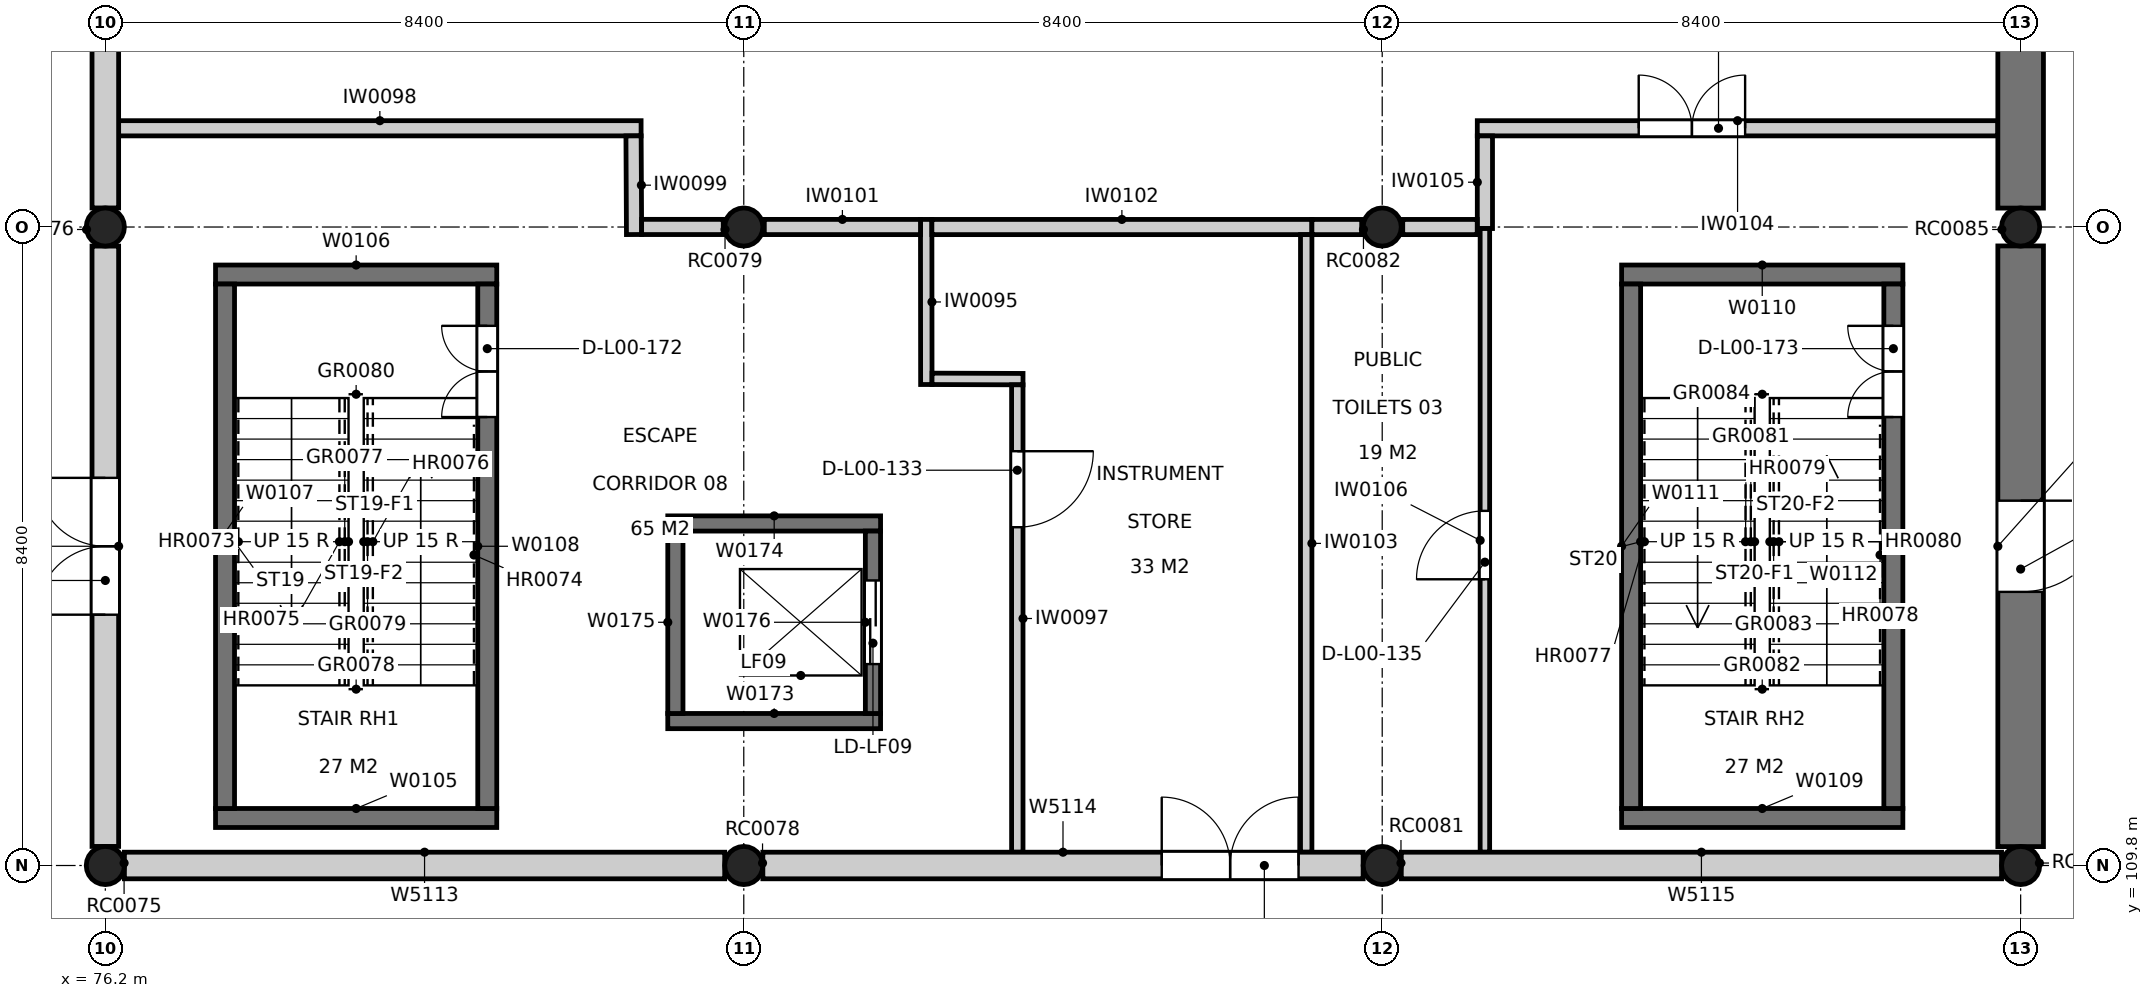
"""IFC4 building model, lengths in metres.
Left out: names, types, materials, properties, quantities, classifications, styles, units other than length and angle.
Written with IfcOpenShell. Run it as: python <this file> out.ifc"""

import sys

from ifc_helpers import new_model, si_unit, direction, frame, frame_2d, origin, origin_2d, place, context, subcontext, project, spatial, rectangle, circle, extrude, element, fill, save


model = new_model("IFC4")
c1 = context("Model", 3, precision=1e-05, world=origin(), true_north=direction((0.0, 1.0)))
c2 = subcontext(c1, "Body", "Model", "MODEL_VIEW")
j1 = project(units=[si_unit("LENGTHUNIT", "METRE"), si_unit("PLANEANGLEUNIT", "RADIAN")], contexts=[c1])
p1 = place(None, origin())
s1 = spatial("IfcSite", under=j1, at=p1, CompositionType="ELEMENT")
p2 = place(p1, origin())
s2 = spatial("IfcBuilding", under=s1, at=p2, CompositionType="ELEMENT")
p3 = place(p2, origin())
s3 = spatial("IfcBuildingStorey", under=s2, at=p3, CompositionType="ELEMENT", Elevation=0.0)
for number, where, z_axis, x_axis in (
    (1, (76.2, 109.8, -0.4), (0.0, 0.0, 1.0), (1.0, 0.0, 0.0)),
    (2, (76.2, 118.2, -0.4), (0.0, 0.0, 1.0), (1.0, 0.0, 0.0)),
    (3, (84.6, 109.8, -0.4), (0.0, 0.0, 1.0), (1.0, 0.0, 0.0)),
    (4, (84.6, 118.2, -0.4), (0.0, 0.0, 1.0), (1.0, 0.0, 0.0)),
    (5, (93.0, 109.8, -0.4), (0.0, 0.0, 1.0), (1.0, 0.0, 0.0)),
    (6, (93.0, 118.2, -0.4), (0.0, 0.0, 1.0), (1.0, 0.0, 0.0)),
    (7, (101.4, 109.8, -0.4), (0.0, 0.0, 1.0), (1.0, 0.0, 0.0)),
    (8, (101.4, 118.2, -0.4), (0.0, 0.0, 1.0), (1.0, 0.0, 0.0)),
):
    element("IfcColumn", number, at=place(p3, frame(where, z_axis=z_axis, x_axis=x_axis)), inside=s3, PredefinedType="COLUMN", context=c2, shape_type="SweptSolid", body=[
        extrude(circle(Radius=0.25, at=origin_2d()), origin(), (0.0, 0.0, 1.0), 5.2),
    ])
p4 = place(p3, frame((101.4, 110.049, 0.0), z_axis=(0.0, 0.0, 1.0), x_axis=(0.0, 1.0, 0.0)))
e9 = element("IfcWall", 9, at=p4, inside=s3, PredefinedType="SOLIDWALL", context=c2, shape_type="SweptSolid", body=[
    extrude(rectangle(XDim=7.902, YDim=0.6, at=frame_2d((3.951, 0.0))), origin(), (0.0, 0.0, 1.0), 4.8),
])
p5 = place(p4, frame((4.551, 0.0, 0.0), z_axis=(0.0, 0.0, 1.0), x_axis=(-1.0, 0.0, 0.0)))
e10 = element("IfcOpeningElement", 10, at=p5, cuts=e9, PredefinedType="OPENING", context=c2, shape_type="SweptSolid", body=[
    extrude(rectangle(XDim=1.2, YDim=2.1, at=frame_2d((0.6, 1.05))), frame((0.0, 0.31, 0.0), z_axis=(0.0, -1.0, 0.0), x_axis=(1.0, 0.0, 0.0)), (0.0, 0.0, 1.0), 0.62),
])
p6 = place(p3, frame((101.4, 118.449, 0.0), z_axis=(0.0, 0.0, 1.0), x_axis=(0.0, 1.0, 0.0)))
e11 = element("IfcWall", 11, at=p6, inside=s3, PredefinedType="SOLIDWALL", context=c2, shape_type="SweptSolid", body=[
    extrude(rectangle(XDim=7.902, YDim=0.6, at=frame_2d((3.951, 0.0))), origin(), (0.0, 0.0, 1.0), 4.8),
])
for number, where, z_axis, x_axis in (
    (12, (77.65, 110.425, 0.0), (0.0, 0.0, 1.0), (1.0, 0.0, 0.0)),
    (13, (77.65, 117.575, 0.0), (0.0, 0.0, 1.0), (1.0, 0.0, 0.0)),
):
    element("IfcWall", number, at=place(p3, frame(where, z_axis=z_axis, x_axis=x_axis)), inside=s3, PredefinedType="SOLIDWALL", context=c2, shape_type="SweptSolid", body=[
        extrude(rectangle(XDim=3.7, YDim=0.25, at=frame_2d((1.85, 0.0))), origin(), (0.0, 0.0, 1.0), 4.8),
    ])
p7 = place(p3, frame((77.775, 110.55, 0.0), z_axis=(0.0, 0.0, 1.0), x_axis=(0.0, 1.0, 0.0)))
e14 = element("IfcWall", 14, at=p7, inside=s3, PredefinedType="SOLIDWALL", context=c2, shape_type="SweptSolid", body=[
    extrude(rectangle(XDim=6.9, YDim=0.25, at=frame_2d((3.45, 0.0))), origin(), (0.0, 0.0, 1.0), 4.8),
])
p8 = place(p3, frame((81.225, 110.55, 0.0), z_axis=(0.0, 0.0, 1.0), x_axis=(0.0, 1.0, 0.0)))
e15 = element("IfcWall", 15, at=p8, inside=s3, PredefinedType="SOLIDWALL", context=c2, shape_type="SweptSolid", body=[
    extrude(rectangle(XDim=6.9, YDim=0.25, at=frame_2d((3.45, 0.0))), origin(), (0.0, 0.0, 1.0), 4.8),
])
p9 = place(p8, frame((5.15, 0.0, 0.0)))
e16 = element("IfcOpeningElement", 16, at=p9, cuts=e15, PredefinedType="OPENING", context=c2, shape_type="SweptSolid", body=[
    extrude(rectangle(XDim=1.2, YDim=2.1, at=frame_2d((0.6, 1.05))), frame((0.0, 0.135, 0.0), z_axis=(0.0, -1.0, 0.0), x_axis=(1.0, 0.0, 0.0)), (0.0, 0.0, 1.0), 0.27),
])
for number, where, z_axis, x_axis in (
    (17, (96.15, 110.425, 0.0), (0.0, 0.0, 1.0), (1.0, 0.0, 0.0)),
    (18, (96.15, 117.575, 0.0), (0.0, 0.0, 1.0), (1.0, 0.0, 0.0)),
):
    element("IfcWall", number, at=place(p3, frame(where, z_axis=z_axis, x_axis=x_axis)), inside=s3, PredefinedType="SOLIDWALL", context=c2, shape_type="SweptSolid", body=[
        extrude(rectangle(XDim=3.7, YDim=0.25, at=frame_2d((1.85, 0.0))), origin(), (0.0, 0.0, 1.0), 4.8),
    ])
p10 = place(p3, frame((96.275, 110.55, 0.0), z_axis=(0.0, 0.0, 1.0), x_axis=(0.0, 1.0, 0.0)))
e19 = element("IfcWall", 19, at=p10, inside=s3, PredefinedType="SOLIDWALL", context=c2, shape_type="SweptSolid", body=[
    extrude(rectangle(XDim=6.9, YDim=0.25, at=frame_2d((3.45, 0.0))), origin(), (0.0, 0.0, 1.0), 4.8),
])
p11 = place(p3, frame((99.725, 110.55, 0.0), z_axis=(0.0, 0.0, 1.0), x_axis=(0.0, 1.0, 0.0)))
e20 = element("IfcWall", 20, at=p11, inside=s3, PredefinedType="SOLIDWALL", context=c2, shape_type="SweptSolid", body=[
    extrude(rectangle(XDim=6.9, YDim=0.25, at=frame_2d((3.45, 0.0))), origin(), (0.0, 0.0, 1.0), 4.8),
])
p12 = place(p11, frame((5.15, 0.0, 0.0)))
e21 = element("IfcOpeningElement", 21, at=p12, cuts=e20, PredefinedType="OPENING", context=c2, shape_type="SweptSolid", body=[
    extrude(rectangle(XDim=1.2, YDim=2.1, at=frame_2d((0.6, 1.05))), frame((0.0, 0.135, 0.0), z_axis=(0.0, -1.0, 0.0), x_axis=(1.0, 0.0, 0.0)), (0.0, 0.0, 1.0), 0.27),
])
for number, where, z_axis, x_axis in (
    (22, (83.6, 111.7, -1.4), (0.0, 0.0, 1.0), (1.0, 0.0, 0.0)),
    (23, (83.6, 114.3, -1.4), (0.0, 0.0, 1.0), (1.0, 0.0, 0.0)),
):
    element("IfcWall", number, at=place(p3, frame(where, z_axis=z_axis, x_axis=x_axis)), inside=s3, PredefinedType="SOLIDWALL", context=c2, shape_type="SweptSolid", body=[
        extrude(rectangle(XDim=2.8, YDim=0.2, at=frame_2d((1.4, 0.0))), origin(), (0.0, 0.0, 1.0), 6.2),
    ])
p13 = place(p3, frame((83.7, 111.8, -1.4), z_axis=(0.0, 0.0, 1.0), x_axis=(0.0, 1.0, 0.0)))
e24 = element("IfcWall", 24, at=p13, inside=s3, PredefinedType="SOLIDWALL", context=c2, shape_type="SweptSolid", body=[
    extrude(rectangle(XDim=2.4, YDim=0.2, at=frame_2d((1.2, 0.0))), origin(), (0.0, 0.0, 1.0), 6.2),
])
p14 = place(p3, frame((86.3, 111.8, -1.4), z_axis=(0.0, 0.0, 1.0), x_axis=(0.0, 1.0, 0.0)))
e25 = element("IfcWall", 25, at=p14, inside=s3, PredefinedType="SOLIDWALL", context=c2, shape_type="SweptSolid", body=[
    extrude(rectangle(XDim=2.4, YDim=0.2, at=frame_2d((1.2, 0.0))), origin(), (0.0, 0.0, 1.0), 6.2),
])
p15 = place(p14, frame((0.65, 0.0, 1.4)))
e26 = element("IfcOpeningElement", 26, at=p15, cuts=e25, PredefinedType="OPENING", context=c2, shape_type="SweptSolid", body=[
    extrude(rectangle(XDim=1.1, YDim=2.1, at=frame_2d((0.55, 1.05))), frame((0.0, 0.11, 0.0), z_axis=(0.0, -1.0, 0.0), x_axis=(1.0, 0.0, 0.0)), (0.0, 0.0, 1.0), 0.22),
])
p16 = place(p3, frame((87.0, 118.3, 0.0), z_axis=(0.0, 0.0, 1.0), x_axis=(0.000899179135, -0.999999595738, 0.0)))
e27 = element("IfcWall", 27, at=p16, inside=s3, PredefinedType="PARTITIONING", context=c2, shape_type="SweptSolid", body=[
    extrude(rectangle(XDim=2.172, YDim=0.15, at=frame_2d((1.086, 0.0))), origin(), (0.0, 0.0, 1.0), 3.8),
])
p17 = place(p3, frame((87.077, 116.203, 0.0), z_axis=(0.0, 0.0, 1.0), x_axis=(0.999994675452, -0.003263290803, 0.0)))
e28 = element("IfcWall", 28, at=p17, inside=s3, PredefinedType="PARTITIONING", context=c2, shape_type="SweptSolid", body=[
    extrude(rectangle(XDim=1.197, YDim=0.15, at=frame_2d((0.599, 0.0))), origin(), (0.0, 0.0, 1.0), 4.6),
])
p18 = place(p3, frame((88.199, 116.124, 0.0), z_axis=(0.0, 0.0, 1.0), x_axis=(0.0, -1.0, 0.0)))
e29 = element("IfcWall", 29, at=p18, inside=s3, PredefinedType="PARTITIONING", context=c2, shape_type="SweptSolid", body=[
    extrude(rectangle(XDim=6.149, YDim=0.15, at=frame_2d((3.074, 0.0))), origin(), (0.0, 0.0, 1.0), 3.9),
])
p19 = place(p18, frame((0.874, 0.0, 0.0)))
e30 = element("IfcOpeningElement", 30, at=p19, cuts=e29, PredefinedType="OPENING", context=c2, shape_type="SweptSolid", body=[
    extrude(rectangle(XDim=1.0, YDim=2.1, at=frame_2d((0.5, 1.05))), frame((0.0, 0.085, 0.0), z_axis=(0.0, -1.0, 0.0), x_axis=(1.0, 0.0, 0.0)), (0.0, 0.0, 1.0), 0.17),
])
p20 = place(p3, frame((76.375, 119.499, 0.0), z_axis=(0.0, 0.0, 1.0), x_axis=(1.0, 0.0, 0.0)))
e31 = element("IfcWall", 31, at=p20, inside=s3, PredefinedType="PARTITIONING", context=c2, shape_type="SweptSolid", body=[
    extrude(rectangle(XDim=6.874, YDim=0.2, at=frame_2d((3.437, 0.0))), origin(), (0.0, 0.0, 1.0), 4.6),
])
p21 = place(p3, frame((83.15, 119.399, 0.0), z_axis=(0.0, 0.0, 1.0), x_axis=(0.005267045074, -0.999986129022, 0.0)))
e32 = element("IfcWall", 32, at=p21, inside=s3, PredefinedType="PARTITIONING", context=c2, shape_type="SweptSolid", body=[
    extrude(rectangle(XDim=1.298, YDim=0.2, at=frame_2d((0.649, 0.0))), origin(), (0.0, 0.0, 1.0), 3.8),
])
p22 = place(p3, frame((83.256, 118.201, 0.0), z_axis=(0.0, 0.0, 1.0), x_axis=(0.999999974162, -0.000227324386, 0.0)))
e33 = element("IfcWall", 33, at=p22, inside=s3, PredefinedType="PARTITIONING", context=c2, shape_type="SweptSolid", body=[
    extrude(rectangle(XDim=1.074, YDim=0.2, at=frame_2d((0.537, 0.0))), origin(), (0.0, 0.0, 1.0), 3.8),
])
p23 = place(p3, frame((84.87, 118.2, 0.0), z_axis=(0.0, 0.0, 1.0), x_axis=(0.99999997177, -0.000237614345, 0.0)))
e34 = element("IfcWall", 34, at=p23, inside=s3, PredefinedType="PARTITIONING", context=c2, shape_type="SweptSolid", body=[
    extrude(rectangle(XDim=2.055, YDim=0.2, at=frame_2d((1.027, 0.0))), origin(), (0.0, 0.0, 1.0), 3.8),
])
p24 = place(p3, frame((87.075, 118.2, 0.0), z_axis=(0.0, 0.0, 1.0), x_axis=(1.0, 0.0, 0.0)))
e35 = element("IfcWall", 35, at=p24, inside=s3, PredefinedType="PARTITIONING", context=c2, shape_type="SweptSolid", body=[
    extrude(rectangle(XDim=5.0, YDim=0.2, at=frame_2d((2.5, 0.0))), origin(), (0.0, 0.0, 1.0), 3.8),
])
p25 = place(p3, frame((92.0, 118.1, 0.0), z_axis=(0.0, 0.0, 1.0), x_axis=(0.0, -1.0, 0.0)))
e36 = element("IfcWall", 36, at=p25, inside=s3, PredefinedType="PARTITIONING", context=c2, shape_type="SweptSolid", body=[
    extrude(rectangle(XDim=8.125, YDim=0.15, at=frame_2d((4.062, 0.0))), origin(), (0.0, 0.0, 1.0), 3.8),
])
p26 = place(p3, frame((94.251, 119.499, 0.0), z_axis=(0.0, 0.0, 1.0), x_axis=(1.0, 0.0, 0.0)))
e37 = element("IfcWall", 37, at=p26, inside=s3, PredefinedType="PARTITIONING", context=c2, shape_type="SweptSolid", body=[
    extrude(rectangle(XDim=6.849, YDim=0.2, at=frame_2d((3.425, 0.0))), origin(), (0.0, 0.0, 1.0), 4.6),
])
p27 = place(p26, frame((2.124, 0.0, 0.0)))
e38 = element("IfcOpeningElement", 38, at=p27, cuts=e37, PredefinedType="OPENING", context=c2, shape_type="SweptSolid", body=[
    extrude(rectangle(XDim=1.4, YDim=2.1, at=frame_2d((0.7, 1.05))), frame((0.0, 0.11, 0.0), z_axis=(0.0, -1.0, 0.0), x_axis=(1.0, 0.0, 0.0)), (0.0, 0.0, 1.0), 0.22),
])
p28 = place(p3, frame((94.351, 118.18, 0.0), z_axis=(0.0, 0.0, 1.0), x_axis=(0.0, 1.0, 0.0)))
e39 = element("IfcWall", 39, at=p28, inside=s3, PredefinedType="PARTITIONING", context=c2, shape_type="SweptSolid", body=[
    extrude(rectangle(XDim=1.219, YDim=0.2, at=frame_2d((0.609, 0.0))), origin(), (0.0, 0.0, 1.0), 3.8),
])
p29 = place(p3, frame((94.351, 109.975, 0.0), z_axis=(0.0, 0.0, 1.0), x_axis=(0.0, 1.0, 0.0)))
e40 = element("IfcWall", 40, at=p29, inside=s3, PredefinedType="PARTITIONING", context=c2, shape_type="SweptSolid", body=[
    extrude(rectangle(XDim=8.205, YDim=0.125, at=frame_2d((4.103, 0.0))), origin(), (0.0, 0.0, 1.0), 3.8),
])
p30 = place(p29, frame((3.591, 0.0, 0.0)))
e41 = element("IfcOpeningElement", 41, at=p30, cuts=e40, PredefinedType="OPENING", context=c2, shape_type="SweptSolid", body=[
    extrude(rectangle(XDim=0.9, YDim=2.1, at=frame_2d((0.45, 1.05))), frame((0.0, 0.073, 0.0), z_axis=(0.0, -1.0, 0.0), x_axis=(1.0, 0.0, 0.0)), (0.0, 0.0, 1.0), 0.145),
])
p31 = place(p3, frame((94.25, 118.2, 0.0), z_axis=(0.0, 0.0, 1.0), x_axis=(-1.0, 0.0, 0.0)))
e42 = element("IfcWall", 42, at=p31, inside=s3, PredefinedType="PARTITIONING", context=c2, shape_type="SweptSolid", body=[
    extrude(rectangle(XDim=0.98, YDim=0.2, at=frame_2d((0.49, 0.0))), origin(), (0.0, 0.0, 1.0), 3.8),
])
p32 = place(p3, frame((92.73, 118.2, 0.0), z_axis=(0.0, 0.0, 1.0), x_axis=(-1.0, 0.0, 0.0)))
e43 = element("IfcWall", 43, at=p32, inside=s3, PredefinedType="PARTITIONING", context=c2, shape_type="SweptSolid", body=[
    extrude(rectangle(XDim=0.655, YDim=0.2, at=frame_2d((0.328, 0.0))), origin(), (0.0, 0.0, 1.0), 3.8),
])
p33 = place(p3, frame((76.2, 126.349, 0.0), z_axis=(0.0, 0.0, 1.0), x_axis=(0.0, -1.0, 0.0)))
e44 = element("IfcWall", 44, at=p33, inside=s3, PredefinedType="SOLIDWALL", context=c2, shape_type="SweptSolid", body=[
    extrude(rectangle(XDim=7.898, YDim=0.35, at=frame_2d((3.949, 0.0))), origin(), (0.0, 0.0, 1.0), 3.8),
])
p34 = place(p3, frame((76.2, 117.949, 0.0), z_axis=(0.0, 0.0, 1.0), x_axis=(0.0, -1.0, 0.0)))
e45 = element("IfcWall", 45, at=p34, inside=s3, PredefinedType="SOLIDWALL", context=c2, shape_type="SweptSolid", body=[
    extrude(rectangle(XDim=7.898, YDim=0.35, at=frame_2d((3.949, 0.0))), origin(), (0.0, 0.0, 1.0), 3.8),
])
p35 = place(p34, frame((4.849, 0.0, 0.0), z_axis=(0.0, 0.0, 1.0), x_axis=(-1.0, 0.0, 0.0)))
e46 = element("IfcOpeningElement", 46, at=p35, cuts=e45, PredefinedType="OPENING", context=c2, shape_type="SweptSolid", body=[
    extrude(rectangle(XDim=1.8, YDim=2.1, at=frame_2d((0.9, 1.05))), frame((0.0, 0.185, 0.0), z_axis=(0.0, -1.0, 0.0), x_axis=(1.0, 0.0, 0.0)), (0.0, 0.0, 1.0), 0.37),
])
p36 = place(p3, frame((76.451, 109.8, 0.0), z_axis=(0.0, 0.0, 1.0), x_axis=(1.0, 0.0, 0.0)))
e47 = element("IfcWall", 47, at=p36, inside=s3, PredefinedType="SOLIDWALL", context=c2, shape_type="SweptSolid", body=[
    extrude(rectangle(XDim=7.898, YDim=0.35, at=frame_2d((3.949, 0.0))), origin(), (0.0, 0.0, 1.0), 3.8),
])
p37 = place(p3, frame((84.851, 109.8, 0.0), z_axis=(0.0, 0.0, 1.0), x_axis=(1.0, 0.0, 0.0)))
e48 = element("IfcWall", 48, at=p37, inside=s3, PredefinedType="SOLIDWALL", context=c2, shape_type="SweptSolid", body=[
    extrude(rectangle(XDim=7.898, YDim=0.35, at=frame_2d((3.949, 0.0))), origin(), (0.0, 0.0, 1.0), 3.8),
])
p38 = place(p37, frame((5.248, 0.0, 0.0)))
e49 = element("IfcOpeningElement", 49, at=p38, cuts=e48, PredefinedType="OPENING", context=c2, shape_type="SweptSolid", body=[
    extrude(rectangle(XDim=1.8, YDim=2.4, at=frame_2d((0.9, 1.2))), frame((0.0, 0.185, 0.0), z_axis=(0.0, -1.0, 0.0), x_axis=(1.0, 0.0, 0.0)), (0.0, 0.0, 1.0), 0.37),
])
p39 = place(p3, frame((93.251, 109.8, 0.0), z_axis=(0.0, 0.0, 1.0), x_axis=(1.0, 0.0, 0.0)))
e50 = element("IfcWall", 50, at=p39, inside=s3, PredefinedType="SOLIDWALL", context=c2, shape_type="SweptSolid", body=[
    extrude(rectangle(XDim=7.898, YDim=0.35, at=frame_2d((3.949, 0.0))), origin(), (0.0, 0.0, 1.0), 3.8),
])
p40 = place(p19, origin())
e51 = element("IfcDoor", 51, at=p40, inside=s3, OperationType="SINGLE_SWING_LEFT", PredefinedType="DOOR", context=c2, shape_type="SweptSolid", body=[
    extrude(rectangle(XDim=1.0, YDim=2.1, at=frame_2d((0.5, 1.05))), frame((0.0, 0.025, 0.0), z_axis=(0.0, -1.0, 0.0), x_axis=(1.0, 0.0, 0.0)), (0.0, 0.0, 1.0), 0.05),
])
fill(e30, e51)
p41 = place(p27, origin())
e52 = element("IfcDoor", 52, at=p41, inside=s3, OperationType="DOUBLE_DOOR_SINGLE_SWING", PredefinedType="DOOR", context=c2, shape_type="SweptSolid", body=[
    extrude(rectangle(XDim=1.4, YDim=2.1, at=frame_2d((0.7, 1.05))), frame((0.0, 0.025, 0.0), z_axis=(0.0, -1.0, 0.0), x_axis=(1.0, 0.0, 0.0)), (0.0, 0.0, 1.0), 0.05),
])
fill(e38, e52)
p42 = place(p30, origin())
e53 = element("IfcDoor", 53, at=p42, inside=s3, OperationType="SINGLE_SWING_LEFT", PredefinedType="DOOR", context=c2, shape_type="SweptSolid", body=[
    extrude(rectangle(XDim=0.9, YDim=2.1, at=frame_2d((0.45, 1.05))), frame((0.0, 0.025, 0.0), z_axis=(0.0, -1.0, 0.0), x_axis=(1.0, 0.0, 0.0)), (0.0, 0.0, 1.0), 0.05),
])
fill(e41, e53)
p43 = place(p9, origin())
e54 = element("IfcDoor", 54, at=p43, inside=s3, OperationType="DOUBLE_DOOR_SINGLE_SWING", PredefinedType="DOOR", context=c2, shape_type="SweptSolid", body=[
    extrude(rectangle(XDim=1.2, YDim=2.1, at=frame_2d((0.6, 1.05))), frame((0.0, 0.025, 0.0), z_axis=(0.0, -1.0, 0.0), x_axis=(1.0, 0.0, 0.0)), (0.0, 0.0, 1.0), 0.05),
])
fill(e16, e54)
p44 = place(p12, origin())
e55 = element("IfcDoor", 55, at=p44, inside=s3, OperationType="DOUBLE_DOOR_SINGLE_SWING", PredefinedType="DOOR", context=c2, shape_type="SweptSolid", body=[
    extrude(rectangle(XDim=1.2, YDim=2.1, at=frame_2d((0.6, 1.05))), frame((0.0, 0.025, 0.0), z_axis=(0.0, -1.0, 0.0), x_axis=(1.0, 0.0, 0.0)), (0.0, 0.0, 1.0), 0.05),
])
fill(e21, e55)
p45 = place(p35, origin())
e56 = element("IfcDoor", 56, at=p45, inside=s3, OperationType="DOUBLE_DOOR_SINGLE_SWING", PredefinedType="DOOR", context=c2, shape_type="SweptSolid", body=[
    extrude(rectangle(XDim=1.8, YDim=2.1, at=frame_2d((0.9, 1.05))), frame((0.0, 0.025, 0.0), z_axis=(0.0, -1.0, 0.0), x_axis=(1.0, 0.0, 0.0)), (0.0, 0.0, 1.0), 0.05),
])
fill(e46, e56)
p46 = place(p38, origin())
e57 = element("IfcDoor", 57, at=p46, inside=s3, OperationType="DOUBLE_DOOR_SINGLE_SWING", PredefinedType="DOOR", context=c2, shape_type="SweptSolid", body=[
    extrude(rectangle(XDim=1.8, YDim=2.4, at=frame_2d((0.9, 1.2))), frame((0.0, 0.025, 0.0), z_axis=(0.0, -1.0, 0.0), x_axis=(1.0, 0.0, 0.0)), (0.0, 0.0, 1.0), 0.05),
])
fill(e49, e57)
p47 = place(p5, origin())
e58 = element("IfcDoor", 58, at=p47, inside=s3, OperationType="SINGLE_SWING_LEFT", PredefinedType="DOOR", context=c2, shape_type="SweptSolid", body=[
    extrude(rectangle(XDim=1.2, YDim=2.1, at=frame_2d((0.6, 1.05))), frame((0.0, 0.025, 0.0), z_axis=(0.0, -1.0, 0.0), x_axis=(1.0, 0.0, 0.0)), (0.0, 0.0, 1.0), 0.05),
])
fill(e10, e58)
p48 = place(p15, origin())
e59 = element("IfcDoor", 59, at=p48, inside=s3, OperationType="SLIDING_TO_LEFT", PredefinedType="DOOR", context=c2, shape_type="SweptSolid", body=[
    extrude(rectangle(XDim=1.1, YDim=2.1, at=frame_2d((0.55, 1.05))), frame((0.0, 0.025, 0.0), z_axis=(0.0, -1.0, 0.0), x_axis=(1.0, 0.0, 0.0)), (0.0, 0.0, 1.0), 0.05),
])
fill(e26, e59)
save(model, sys.argv[1])
